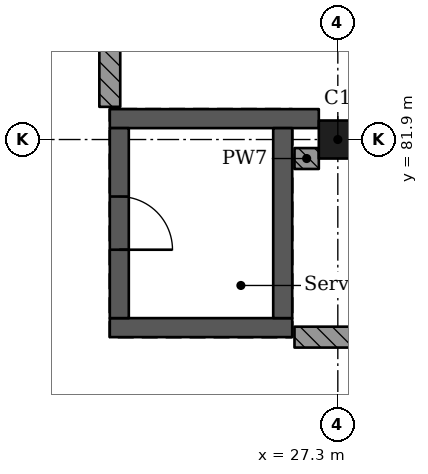
"""IFC4 building model, lengths in metres.
Left out: names, types, materials, properties, quantities, classifications, styles, units other than length and angle.
Written with IfcOpenShell. Run it as: python <this file> out.ifc"""

import sys

from ifc_helpers import new_model, si_unit, direction, frame, frame_2d, origin, origin_2d, place, context, subcontext, project, spatial, rectangle, extrude, element, fill, save


model = new_model("IFC4")
c1 = context("Model", 3, precision=1e-05, world=origin(), true_north=direction((0.0, 1.0)))
c2 = subcontext(c1, "Body", "Model", "MODEL_VIEW")
j1 = project(units=[si_unit("LENGTHUNIT", "METRE"), si_unit("PLANEANGLEUNIT", "RADIAN")], contexts=[c1])
p1 = place(None, origin())
s1 = spatial("IfcSite", under=j1, at=p1, CompositionType="ELEMENT")
p2 = place(p1, origin())
s2 = spatial("IfcBuilding", under=s1, at=p2, CompositionType="ELEMENT")
p3 = place(p2, frame((0.0, 0.0, 29.12)))
s3 = spatial("IfcBuildingStorey", under=s2, at=p3, CompositionType="ELEMENT", Elevation=29.12)
p4 = place(p3, frame((27.3, 81.9, 0.0), z_axis=(0.0, 0.0, 1.0), x_axis=(1.0, 0.0, 0.0)))
e1 = element("IfcColumn", 1, at=p4, inside=s3, PredefinedType="COLUMN", context=c2, shape_type="SweptSolid", body=[
    extrude(rectangle(XDim=0.5, YDim=0.5, at=origin_2d()), origin(), (0.0, 0.0, 1.0), 4.55),
])
p5 = place(p3, frame((26.7, 79.425, 0.0), z_axis=(0.0, 0.0, 1.0), x_axis=(-1.0, 0.0, 0.0)))
e2 = element("IfcWall", 2, at=p5, inside=s3, PredefinedType="SHEAR", context=c2, shape_type="SweptSolid", body=[
    extrude(rectangle(XDim=2.4, YDim=0.25, at=frame_2d((1.2, 0.0))), origin(), (0.0, 0.0, 1.0), 4.55),
])
p6 = place(p3, frame((27.05, 82.175, 0.0), z_axis=(0.0, 0.0, 1.0), x_axis=(-1.0, 0.0, 0.0)))
e3 = element("IfcWall", 3, at=p6, inside=s3, PredefinedType="SHEAR", context=c2, shape_type="SweptSolid", body=[
    extrude(rectangle(XDim=2.75, YDim=0.25, at=frame_2d((1.375, 0.0))), origin(), (0.0, 0.0, 1.0), 4.55),
])
p7 = place(p3, frame((24.425, 82.05, 0.0), z_axis=(0.0, 0.0, 1.0), x_axis=(0.0, -1.0, 0.0)))
e4 = element("IfcWall", 4, at=p7, inside=s3, PredefinedType="SHEAR", context=c2, shape_type="SweptSolid", body=[
    extrude(rectangle(XDim=2.5, YDim=0.25, at=frame_2d((1.25, 0.0))), origin(), (0.0, 0.0, 1.0), 4.55),
])
p8 = place(p7, frame((0.9, 0.0, 0.0)))
e5 = element("IfcOpeningElement", 5, at=p8, cuts=e4, PredefinedType="OPENING", context=c2, shape_type="SweptSolid", body=[
    extrude(rectangle(XDim=0.7, YDim=2.1, at=frame_2d((0.35, 1.05))), frame((0.0, 0.135, 0.0), z_axis=(0.0, -1.0, 0.0), x_axis=(1.0, 0.0, 0.0)), (0.0, 0.0, 1.0), 0.27),
])
p9 = place(p3, frame((26.575, 82.05, 0.0), z_axis=(0.0, 0.0, 1.0), x_axis=(0.0, -1.0, 0.0)))
e6 = element("IfcWall", 6, at=p9, inside=s3, PredefinedType="SHEAR", context=c2, shape_type="SweptSolid", body=[
    extrude(rectangle(XDim=2.5, YDim=0.25, at=frame_2d((1.25, 0.0))), origin(), (0.0, 0.0, 1.0), 4.55),
])
p10 = place(p3, frame((24.3, 82.33, 0.0), z_axis=(0.0, 0.0, 1.0), x_axis=(0.0, 1.0, 0.0)))
e7 = element("IfcWall", 7, at=p10, inside=s3, PredefinedType="SOLIDWALL", context=c2, shape_type="SweptSolid", body=[
    extrude(rectangle(XDim=6.932, YDim=0.275, at=frame_2d((3.466, 0.0))), origin(), (0.0, 0.0, 1.0), 3.88),
])
p11 = place(p3, frame((26.73, 81.65, 0.0), z_axis=(0.0, 0.0, 1.0), x_axis=(1.0, 0.0, 0.0)))
e8 = element("IfcWall", 8, at=p11, inside=s3, PredefinedType="SOLIDWALL", context=c2, shape_type="SweptSolid", body=[
    extrude(rectangle(XDim=0.32, YDim=0.275, at=frame_2d((0.16, 0.0))), origin(), (0.0, 0.0, 1.0), 3.88),
])
p12 = place(p3, frame((26.73, 79.3, 0.0), z_axis=(0.0, 0.0, 1.0), x_axis=(1.0, 0.0, 0.0)))
e9 = element("IfcWall", 9, at=p12, inside=s3, PredefinedType="SOLIDWALL", context=c2, shape_type="SweptSolid", body=[
    extrude(rectangle(XDim=6.808, YDim=0.275, at=frame_2d((3.404, 0.0))), origin(), (0.0, 0.0, 1.0), 3.88),
])
p13 = place(p8, origin())
e10 = element("IfcDoor", 10, at=p13, inside=s3, OperationType="SINGLE_SWING_LEFT", PredefinedType="DOOR", context=c2, shape_type="SweptSolid", body=[
    extrude(rectangle(XDim=0.7, YDim=2.1, at=frame_2d((0.35, 1.05))), frame((0.0, 0.025, 0.0), z_axis=(0.0, -1.0, 0.0), x_axis=(1.0, 0.0, 0.0)), (0.0, 0.0, 1.0), 0.05),
])
fill(e5, e10)
save(model, sys.argv[1])
